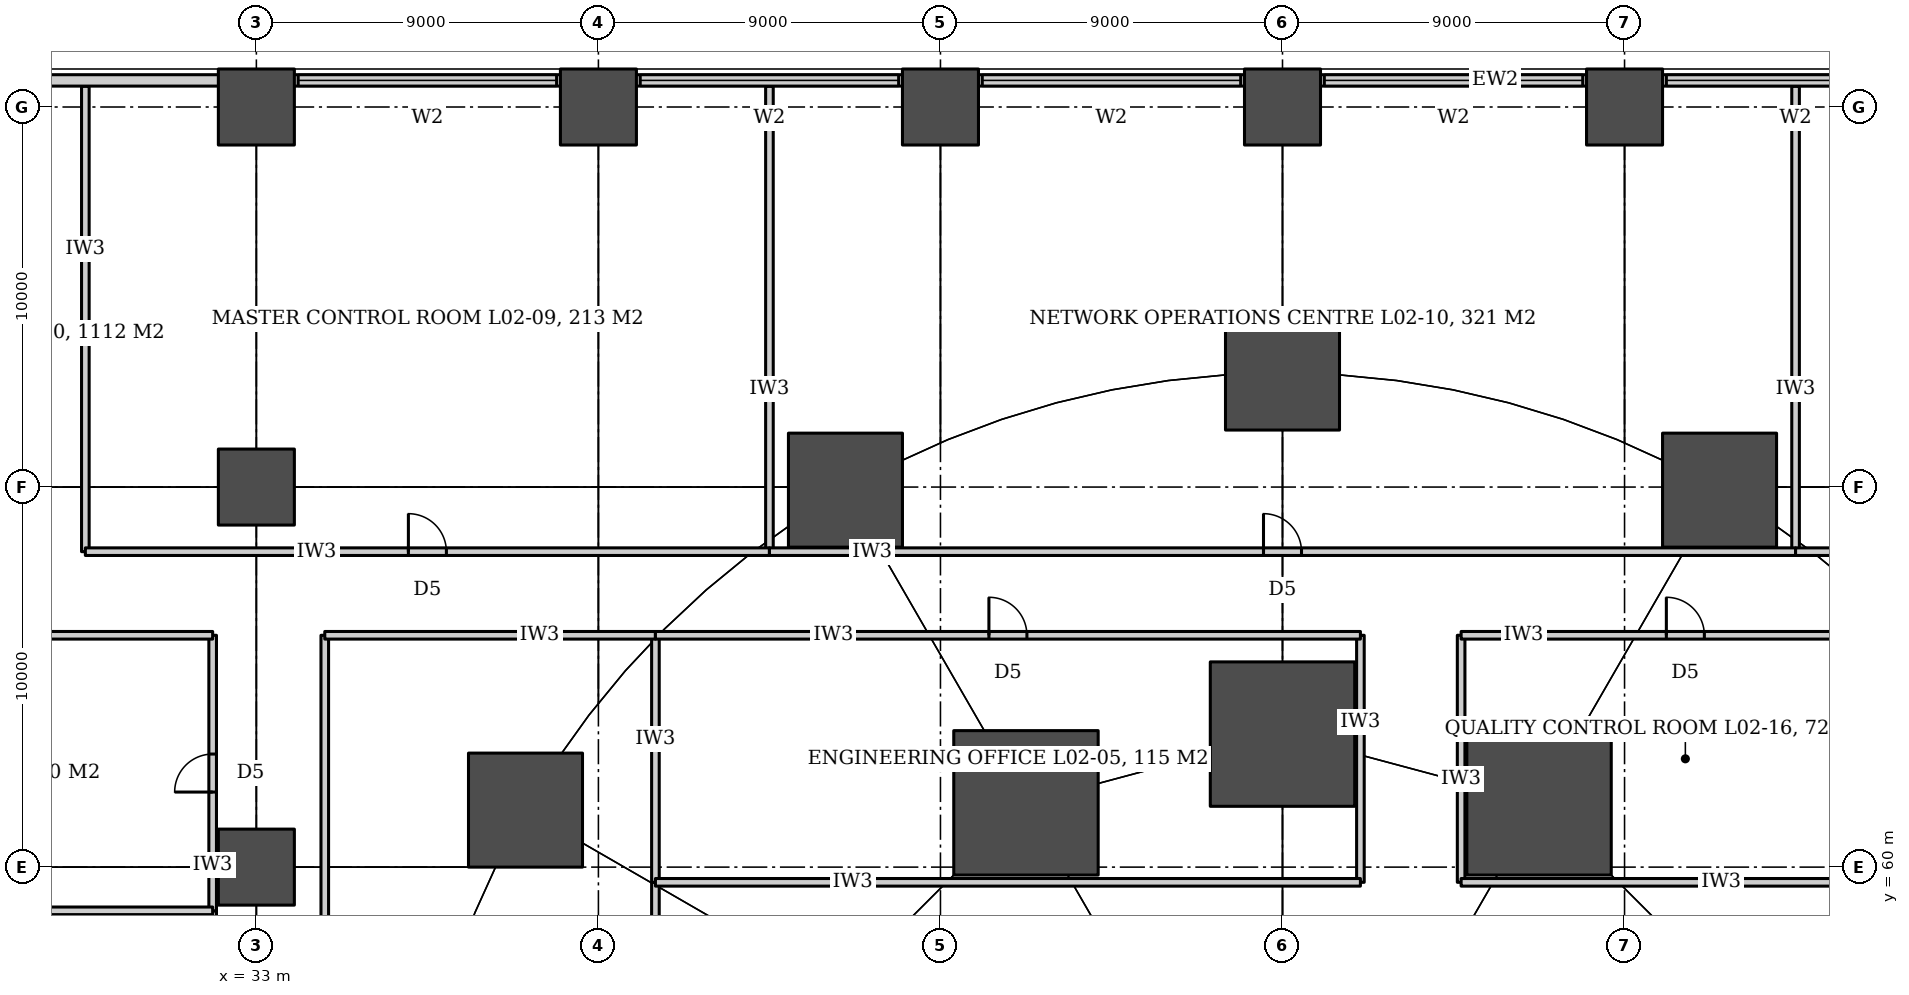
"""IFC4 building model, lengths in metres.
Left out: names, types, materials, properties, quantities, classifications, styles, units other than length and angle.
Written with IfcOpenShell. Run it as: python <this file> out.ifc"""

import sys

from ifc_helpers import new_model, si_unit, direction, frame, frame_2d, origin, origin_2d, place, context, subcontext, project, spatial, rectangle, circle, extrude, element, fill, save


model = new_model("IFC4")
c1 = context("Model", 3, precision=1e-05, world=origin(), true_north=direction((0.0, 1.0)))
c2 = subcontext(c1, "Body", "Model", "MODEL_VIEW")
j1 = project(units=[si_unit("LENGTHUNIT", "METRE"), si_unit("PLANEANGLEUNIT", "RADIAN")], contexts=[c1])
p1 = place(None, origin())
s1 = spatial("IfcSite", under=j1, at=p1, CompositionType="ELEMENT")
p2 = place(p1, origin())
s2 = spatial("IfcBuilding", under=s1, at=p2, CompositionType="ELEMENT")
p3 = place(p2, frame((0.0, 0.0, 15.0)))
s3 = spatial("IfcBuildingStorey", under=s2, at=p3, CompositionType="ELEMENT", Elevation=15.0)
for number, where, z_axis, x_axis in (
    (1, (33.0, 60.0, 0.0), (0.0, 0.0, 1.0), (1.0, 0.0, 0.0)),
    (2, (33.0, 70.0, 0.0), (0.0, 0.0, 1.0), (1.0, 0.0, 0.0)),
    (3, (33.0, 80.0, 0.0), (0.0, 0.0, 1.0), (1.0, 0.0, 0.0)),
    (4, (42.0, 80.0, 0.0), (0.0, 0.0, 1.0), (1.0, 0.0, 0.0)),
    (5, (51.0, 80.0, 0.0), (0.0, 0.0, 1.0), (1.0, 0.0, 0.0)),
    (6, (60.0, 80.0, 0.0), (0.0, 0.0, 1.0), (1.0, 0.0, 0.0)),
    (7, (69.0, 80.0, 0.0), (0.0, 0.0, 1.0), (1.0, 0.0, 0.0)),
):
    element("IfcColumn", number, at=place(p3, frame(where, z_axis=z_axis, x_axis=x_axis)), inside=s3, PredefinedType="COLUMN", context=c2, shape_type="SweptSolid", body=[
        extrude(rectangle(XDim=2.0, YDim=2.0, at=origin_2d()), origin(), (0.0, 0.0, 1.0), 5.0),
    ])
for number, where, z_axis, x_axis in (
    (8, (71.5, 69.919, 0.0), (0.0, 0.0, 1.0), (1.0, 0.0, 0.0)),
    (9, (60.0, 73.0, 0.0), (0.0, 0.0, 1.0), (1.0, 0.0, 0.0)),
    (10, (48.5, 69.919, 0.0), (0.0, 0.0, 1.0), (1.0, 0.0, 0.0)),
    (11, (40.081, 61.5, 0.0), (0.0, 0.0, 1.0), (1.0, 0.0, 0.0)),
):
    element("IfcColumn", number, at=place(p3, frame(where, z_axis=z_axis, x_axis=x_axis)), inside=s3, PredefinedType="COLUMN", context=c2, shape_type="SweptSolid", body=[
        extrude(circle(Radius=1.5, at=origin_2d()), origin(), (0.0, 0.0, 1.0), 5.0),
    ])
for number, where, z_axis, x_axis in (
    (12, (66.75, 61.691, 0.0), (0.0, 0.0, 1.0), (1.0, 0.0, 0.0)),
    (13, (60.0, 63.5, 0.0), (0.0, 0.0, 1.0), (1.0, 0.0, 0.0)),
    (14, (53.25, 61.691, 0.0), (0.0, 0.0, 1.0), (1.0, 0.0, 0.0)),
):
    element("IfcColumn", number, at=place(p3, frame(where, z_axis=z_axis, x_axis=x_axis)), inside=s3, PredefinedType="COLUMN", context=c2, shape_type="SweptSolid", body=[
        extrude(circle(Radius=1.9, at=origin_2d()), origin(), (0.0, 0.0, 1.0), 5.0),
    ])
p4 = place(p3, frame((28.5, 68.3, 0.0), z_axis=(0.0, 0.0, 1.0), x_axis=(0.0, 1.0, 0.0)))
e15 = element("IfcWall", 15, at=p4, inside=s3, PredefinedType="PARTITIONING", context=c2, shape_type="SweptSolid", body=[
    extrude(rectangle(XDim=12.245, YDim=0.2, at=frame_2d((6.123, 0.0))), origin(), (0.0, 0.0, 1.0), 2.68),
])
p5 = place(p3, frame((31.85, 41.15, 0.0), z_axis=(0.0, 0.0, 1.0), x_axis=(0.0, 1.0, 0.0)))
e16 = element("IfcWall", 16, at=p5, inside=s3, PredefinedType="PARTITIONING", context=c2, shape_type="SweptSolid", body=[
    extrude(rectangle(XDim=17.7, YDim=0.2, at=frame_2d((8.85, 0.0))), origin(), (0.0, 0.0, 1.0), 2.18),
])
p6 = place(p5, frame((8.35, 0.0, 0.0)))
e17 = element("IfcOpeningElement", 17, at=p6, cuts=e16, PredefinedType="OPENING", context=c2, shape_type="SweptSolid", body=[
    extrude(rectangle(XDim=1.0, YDim=2.1, at=frame_2d((0.5, 1.05))), frame((0.0, 0.11, 0.0), z_axis=(0.0, -1.0, 0.0), x_axis=(1.0, 0.0, 0.0)), (0.0, 0.0, 1.0), 0.22),
])
p7 = place(p3, frame((31.85, 58.85, 0.0), z_axis=(0.0, 0.0, 1.0), x_axis=(0.0, 1.0, 0.0)))
e18 = element("IfcWall", 18, at=p7, inside=s3, PredefinedType="PARTITIONING", context=c2, shape_type="SweptSolid", body=[
    extrude(rectangle(XDim=7.25, YDim=0.2, at=frame_2d((3.625, 0.0))), origin(), (0.0, 0.0, 1.0), 2.18),
])
p8 = place(p7, frame((3.125, 0.0, 0.0)))
e19 = element("IfcOpeningElement", 19, at=p8, cuts=e18, PredefinedType="OPENING", context=c2, shape_type="SweptSolid", body=[
    extrude(rectangle(XDim=1.0, YDim=2.1, at=frame_2d((0.5, 1.05))), frame((0.0, 0.11, 0.0), z_axis=(0.0, -1.0, 0.0), x_axis=(1.0, 0.0, 0.0)), (0.0, 0.0, 1.0), 0.22),
])
p9 = place(p3, frame((34.8, 48.35, 0.0), z_axis=(0.0, 0.0, 1.0), x_axis=(0.0, 1.0, 0.0)))
e20 = element("IfcWall", 20, at=p9, inside=s3, PredefinedType="PARTITIONING", context=c2, shape_type="SweptSolid", body=[
    extrude(rectangle(XDim=17.75, YDim=0.2, at=frame_2d((8.875, 0.0))), origin(), (0.0, 0.0, 1.0), 2.18),
])
p10 = place(p9, frame((8.375, 0.0, 0.0)))
e21 = element("IfcOpeningElement", 21, at=p10, cuts=e20, PredefinedType="OPENING", context=c2, shape_type="SweptSolid", body=[
    extrude(rectangle(XDim=1.0, YDim=2.1, at=frame_2d((0.5, 1.05))), frame((0.0, 0.11, 0.0), z_axis=(0.0, -1.0, 0.0), x_axis=(1.0, 0.0, 0.0)), (0.0, 0.0, 1.0), 0.22),
])
p11 = place(p3, frame((43.5, 48.35, 0.0), z_axis=(0.0, 0.0, 1.0), x_axis=(0.0, 1.0, 0.0)))
e22 = element("IfcWall", 22, at=p11, inside=s3, PredefinedType="PARTITIONING", context=c2, shape_type="SweptSolid", body=[
    extrude(rectangle(XDim=11.25, YDim=0.2, at=frame_2d((5.625, 0.0))), origin(), (0.0, 0.0, 1.0), 2.08),
])
p12 = place(p3, frame((43.5, 59.6, 0.0), z_axis=(0.0, 0.0, 1.0), x_axis=(0.0, 1.0, 0.0)))
e23 = element("IfcWall", 23, at=p12, inside=s3, PredefinedType="PARTITIONING", context=c2, shape_type="SweptSolid", body=[
    extrude(rectangle(XDim=6.5, YDim=0.2, at=frame_2d((3.25, 0.0))), origin(), (0.0, 0.0, 1.0), 2.08),
])
p13 = place(p3, frame((46.5, 68.3, 0.0), z_axis=(0.0, 0.0, 1.0), x_axis=(0.0, 1.0, 0.0)))
e24 = element("IfcWall", 24, at=p13, inside=s3, PredefinedType="PARTITIONING", context=c2, shape_type="SweptSolid", body=[
    extrude(rectangle(XDim=12.245, YDim=0.2, at=frame_2d((6.123, 0.0))), origin(), (0.0, 0.0, 1.0), 2.68),
])
p14 = place(p3, frame((62.05, 59.6, 0.0), z_axis=(0.0, 0.0, 1.0), x_axis=(0.0, 1.0, 0.0)))
e25 = element("IfcWall", 25, at=p14, inside=s3, PredefinedType="PARTITIONING", context=c2, shape_type="SweptSolid", body=[
    extrude(rectangle(XDim=6.5, YDim=0.2, at=frame_2d((3.25, 0.0))), origin(), (0.0, 0.0, 1.0), 2.08),
])
p15 = place(p3, frame((64.7, 59.6, 0.0), z_axis=(0.0, 0.0, 1.0), x_axis=(0.0, 1.0, 0.0)))
e26 = element("IfcWall", 26, at=p15, inside=s3, PredefinedType="PARTITIONING", context=c2, shape_type="SweptSolid", body=[
    extrude(rectangle(XDim=6.5, YDim=0.2, at=frame_2d((3.25, 0.0))), origin(), (0.0, 0.0, 1.0), 1.48),
])
p16 = place(p3, frame((73.5, 68.3, 0.0), z_axis=(0.0, 0.0, 1.0), x_axis=(0.0, 1.0, 0.0)))
e27 = element("IfcWall", 27, at=p16, inside=s3, PredefinedType="PARTITIONING", context=c2, shape_type="SweptSolid", body=[
    extrude(rectangle(XDim=12.245, YDim=0.2, at=frame_2d((6.123, 0.0))), origin(), (0.0, 0.0, 1.0), 2.68),
])
p17 = place(p3, frame((14.455, 58.85, 0.0), z_axis=(0.0, 0.0, 1.0), x_axis=(1.0, 0.0, 0.0)))
e28 = element("IfcWall", 28, at=p17, inside=s3, PredefinedType="PARTITIONING", context=c2, shape_type="SweptSolid", body=[
    extrude(rectangle(XDim=17.395, YDim=0.2, at=frame_2d((8.698, 0.0))), origin(), (0.0, 0.0, 1.0), 2.68),
])
p18 = place(p3, frame((43.5, 59.6, 0.0), z_axis=(0.0, 0.0, 1.0), x_axis=(1.0, 0.0, 0.0)))
e29 = element("IfcWall", 29, at=p18, inside=s3, PredefinedType="PARTITIONING", context=c2, shape_type="SweptSolid", body=[
    extrude(rectangle(XDim=18.55, YDim=0.2, at=frame_2d((9.275, 0.0))), origin(), (0.0, 0.0, 1.0), 1.48),
])
p19 = place(p3, frame((64.7, 59.6, 0.0), z_axis=(0.0, 0.0, 1.0), x_axis=(1.0, 0.0, 0.0)))
e30 = element("IfcWall", 30, at=p19, inside=s3, PredefinedType="PARTITIONING", context=c2, shape_type="SweptSolid", body=[
    extrude(rectangle(XDim=11.8, YDim=0.2, at=frame_2d((5.9, 0.0))), origin(), (0.0, 0.0, 1.0), 1.48),
])
p20 = place(p3, frame((14.455, 66.1, 0.0), z_axis=(0.0, 0.0, 1.0), x_axis=(1.0, 0.0, 0.0)))
e31 = element("IfcWall", 31, at=p20, inside=s3, PredefinedType="PARTITIONING", context=c2, shape_type="SweptSolid", body=[
    extrude(rectangle(XDim=17.395, YDim=0.2, at=frame_2d((8.698, 0.0))), origin(), (0.0, 0.0, 1.0), 2.68),
])
p21 = place(p3, frame((34.8, 66.1, 0.0), z_axis=(0.0, 0.0, 1.0), x_axis=(1.0, 0.0, 0.0)))
e32 = element("IfcWall", 32, at=p21, inside=s3, PredefinedType="PARTITIONING", context=c2, shape_type="SweptSolid", body=[
    extrude(rectangle(XDim=8.7, YDim=0.2, at=frame_2d((4.35, 0.0))), origin(), (0.0, 0.0, 1.0), 2.68),
])
p22 = place(p3, frame((43.5, 66.1, 0.0), z_axis=(0.0, 0.0, 1.0), x_axis=(1.0, 0.0, 0.0)))
e33 = element("IfcWall", 33, at=p22, inside=s3, PredefinedType="PARTITIONING", context=c2, shape_type="SweptSolid", body=[
    extrude(rectangle(XDim=18.55, YDim=0.2, at=frame_2d((9.275, 0.0))), origin(), (0.0, 0.0, 1.0), 2.08),
])
p23 = place(p22, frame((8.775, 0.0, 0.0)))
e34 = element("IfcOpeningElement", 34, at=p23, cuts=e33, PredefinedType="OPENING", context=c2, shape_type="SweptSolid", body=[
    extrude(rectangle(XDim=1.0, YDim=2.1, at=frame_2d((0.5, 1.05))), frame((0.0, 0.11, 0.0), z_axis=(0.0, -1.0, 0.0), x_axis=(1.0, 0.0, 0.0)), (0.0, 0.0, 1.0), 0.22),
])
p24 = place(p3, frame((64.7, 66.1, 0.0), z_axis=(0.0, 0.0, 1.0), x_axis=(1.0, 0.0, 0.0)))
e35 = element("IfcWall", 35, at=p24, inside=s3, PredefinedType="PARTITIONING", context=c2, shape_type="SweptSolid", body=[
    extrude(rectangle(XDim=11.8, YDim=0.2, at=frame_2d((5.9, 0.0))), origin(), (0.0, 0.0, 1.0), 2.08),
])
p25 = place(p24, frame((5.4, 0.0, 0.0)))
e36 = element("IfcOpeningElement", 36, at=p25, cuts=e35, PredefinedType="OPENING", context=c2, shape_type="SweptSolid", body=[
    extrude(rectangle(XDim=1.0, YDim=2.1, at=frame_2d((0.5, 1.05))), frame((0.0, 0.11, 0.0), z_axis=(0.0, -1.0, 0.0), x_axis=(1.0, 0.0, 0.0)), (0.0, 0.0, 1.0), 0.22),
])
p26 = place(p3, frame((28.5, 68.3, 0.0), z_axis=(0.0, 0.0, 1.0), x_axis=(1.0, 0.0, 0.0)))
e37 = element("IfcWall", 37, at=p26, inside=s3, PredefinedType="PARTITIONING", context=c2, shape_type="SweptSolid", body=[
    extrude(rectangle(XDim=18.0, YDim=0.2, at=frame_2d((9.0, 0.0))), origin(), (0.0, 0.0, 1.0), 2.68),
])
p27 = place(p26, frame((8.5, 0.0, 0.0)))
e38 = element("IfcOpeningElement", 38, at=p27, cuts=e37, PredefinedType="OPENING", context=c2, shape_type="SweptSolid", body=[
    extrude(rectangle(XDim=1.0, YDim=2.1, at=frame_2d((0.5, 1.05))), frame((0.0, 0.11, 0.0), z_axis=(0.0, -1.0, 0.0), x_axis=(1.0, 0.0, 0.0)), (0.0, 0.0, 1.0), 0.22),
])
p28 = place(p3, frame((46.5, 68.3, 0.0), z_axis=(0.0, 0.0, 1.0), x_axis=(1.0, 0.0, 0.0)))
e39 = element("IfcWall", 39, at=p28, inside=s3, PredefinedType="PARTITIONING", context=c2, shape_type="SweptSolid", body=[
    extrude(rectangle(XDim=27.0, YDim=0.2, at=frame_2d((13.5, 0.0))), origin(), (0.0, 0.0, 1.0), 2.08),
])
p29 = place(p28, frame((13.0, 0.0, 0.0)))
e40 = element("IfcOpeningElement", 40, at=p29, cuts=e39, PredefinedType="OPENING", context=c2, shape_type="SweptSolid", body=[
    extrude(rectangle(XDim=1.0, YDim=2.1, at=frame_2d((0.5, 1.05))), frame((0.0, 0.11, 0.0), z_axis=(0.0, -1.0, 0.0), x_axis=(1.0, 0.0, 0.0)), (0.0, 0.0, 1.0), 0.22),
])
p30 = place(p3, frame((73.5, 68.3, 0.0), z_axis=(0.0, 0.0, 1.0), x_axis=(1.0, 0.0, 0.0)))
e41 = element("IfcWall", 41, at=p30, inside=s3, PredefinedType="PARTITIONING", context=c2, shape_type="SweptSolid", body=[
    extrude(rectangle(XDim=18.0, YDim=0.2, at=frame_2d((9.0, 0.0))), origin(), (0.0, 0.0, 1.0), 2.68),
])
p31 = place(p30, frame((8.5, 0.0, 0.0)))
e42 = element("IfcOpeningElement", 42, at=p31, cuts=e41, PredefinedType="OPENING", context=c2, shape_type="SweptSolid", body=[
    extrude(rectangle(XDim=1.0, YDim=2.1, at=frame_2d((0.5, 1.05))), frame((0.0, 0.11, 0.0), z_axis=(0.0, -1.0, 0.0), x_axis=(1.0, 0.0, 0.0)), (0.0, 0.0, 1.0), 0.22),
])
p32 = place(p3, frame((95.0, 80.7, 0.0), z_axis=(0.0, 0.0, 1.0), x_axis=(-1.0, 0.0, 0.0)))
e43 = element("IfcWall", 43, at=p32, inside=s3, PredefinedType="SOLIDWALL", context=c2, shape_type="SweptSolid", body=[
    extrude(rectangle(XDim=70.0, YDim=0.3, at=frame_2d((35.0, 0.0))), origin(), (0.0, 0.0, 1.0), 4.7),
])
p33 = place(p32, frame((54.1, 0.0, 1.2)))
e44 = element("IfcOpeningElement", 44, at=p33, cuts=e43, PredefinedType="OPENING", context=c2, shape_type="SweptSolid", body=[
    extrude(rectangle(XDim=6.8, YDim=1.5, at=frame_2d((3.4, 0.75))), frame((0.0, 0.16, 0.0), z_axis=(0.0, -1.0, 0.0), x_axis=(1.0, 0.0, 0.0)), (0.0, 0.0, 1.0), 0.32),
])
p34 = place(p32, frame((45.1, 0.0, 1.2)))
e45 = element("IfcOpeningElement", 45, at=p34, cuts=e43, PredefinedType="OPENING", context=c2, shape_type="SweptSolid", body=[
    extrude(rectangle(XDim=6.8, YDim=1.5, at=frame_2d((3.4, 0.75))), frame((0.0, 0.16, 0.0), z_axis=(0.0, -1.0, 0.0), x_axis=(1.0, 0.0, 0.0)), (0.0, 0.0, 1.0), 0.32),
])
p35 = place(p32, frame((36.1, 0.0, 1.2)))
e46 = element("IfcOpeningElement", 46, at=p35, cuts=e43, PredefinedType="OPENING", context=c2, shape_type="SweptSolid", body=[
    extrude(rectangle(XDim=6.8, YDim=1.5, at=frame_2d((3.4, 0.75))), frame((0.0, 0.16, 0.0), z_axis=(0.0, -1.0, 0.0), x_axis=(1.0, 0.0, 0.0)), (0.0, 0.0, 1.0), 0.32),
])
p36 = place(p32, frame((27.1, 0.0, 1.2)))
e47 = element("IfcOpeningElement", 47, at=p36, cuts=e43, PredefinedType="OPENING", context=c2, shape_type="SweptSolid", body=[
    extrude(rectangle(XDim=6.8, YDim=1.5, at=frame_2d((3.4, 0.75))), frame((0.0, 0.16, 0.0), z_axis=(0.0, -1.0, 0.0), x_axis=(1.0, 0.0, 0.0)), (0.0, 0.0, 1.0), 0.32),
])
p37 = place(p32, frame((18.1, 0.0, 1.2)))
e48 = element("IfcOpeningElement", 48, at=p37, cuts=e43, PredefinedType="OPENING", context=c2, shape_type="SweptSolid", body=[
    extrude(rectangle(XDim=6.8, YDim=1.5, at=frame_2d((3.4, 0.75))), frame((0.0, 0.16, 0.0), z_axis=(0.0, -1.0, 0.0), x_axis=(1.0, 0.0, 0.0)), (0.0, 0.0, 1.0), 0.32),
])
p38 = place(p32, frame((9.1, 0.0, 1.2)))
e49 = element("IfcOpeningElement", 49, at=p38, cuts=e43, PredefinedType="OPENING", context=c2, shape_type="SweptSolid", body=[
    extrude(rectangle(XDim=6.8, YDim=1.5, at=frame_2d((3.4, 0.75))), frame((0.0, 0.16, 0.0), z_axis=(0.0, -1.0, 0.0), x_axis=(1.0, 0.0, 0.0)), (0.0, 0.0, 1.0), 0.32),
])
p39 = place(p27, origin())
e50 = element("IfcDoor", 50, at=p39, inside=s3, OperationType="SINGLE_SWING_LEFT", PredefinedType="DOOR", context=c2, shape_type="SweptSolid", body=[
    extrude(rectangle(XDim=1.0, YDim=2.1, at=frame_2d((0.5, 1.05))), frame((0.0, 0.025, 0.0), z_axis=(0.0, -1.0, 0.0), x_axis=(1.0, 0.0, 0.0)), (0.0, 0.0, 1.0), 0.05),
])
fill(e38, e50)
p40 = place(p29, origin())
e51 = element("IfcDoor", 51, at=p40, inside=s3, OperationType="SINGLE_SWING_LEFT", PredefinedType="DOOR", context=c2, shape_type="SweptSolid", body=[
    extrude(rectangle(XDim=1.0, YDim=2.1, at=frame_2d((0.5, 1.05))), frame((0.0, 0.025, 0.0), z_axis=(0.0, -1.0, 0.0), x_axis=(1.0, 0.0, 0.0)), (0.0, 0.0, 1.0), 0.05),
])
fill(e40, e51)
p41 = place(p23, origin())
e52 = element("IfcDoor", 52, at=p41, inside=s3, OperationType="SINGLE_SWING_LEFT", PredefinedType="DOOR", context=c2, shape_type="SweptSolid", body=[
    extrude(rectangle(XDim=1.0, YDim=2.1, at=frame_2d((0.5, 1.05))), frame((0.0, 0.025, 0.0), z_axis=(0.0, -1.0, 0.0), x_axis=(1.0, 0.0, 0.0)), (0.0, 0.0, 1.0), 0.05),
])
fill(e34, e52)
p42 = place(p25, origin())
e53 = element("IfcDoor", 53, at=p42, inside=s3, OperationType="SINGLE_SWING_LEFT", PredefinedType="DOOR", context=c2, shape_type="SweptSolid", body=[
    extrude(rectangle(XDim=1.0, YDim=2.1, at=frame_2d((0.5, 1.05))), frame((0.0, 0.025, 0.0), z_axis=(0.0, -1.0, 0.0), x_axis=(1.0, 0.0, 0.0)), (0.0, 0.0, 1.0), 0.05),
])
fill(e36, e53)
p43 = place(p8, origin())
e54 = element("IfcDoor", 54, at=p43, inside=s3, OperationType="SINGLE_SWING_LEFT", PredefinedType="DOOR", context=c2, shape_type="SweptSolid", body=[
    extrude(rectangle(XDim=1.0, YDim=2.1, at=frame_2d((0.5, 1.05))), frame((0.0, 0.025, 0.0), z_axis=(0.0, -1.0, 0.0), x_axis=(1.0, 0.0, 0.0)), (0.0, 0.0, 1.0), 0.05),
])
fill(e19, e54)
p44 = place(p33, origin())
e55 = element("IfcWindow", 55, at=p44, inside=s3, PartitioningType="SINGLE_PANEL", PredefinedType="WINDOW", context=c2, shape_type="SweptSolid", body=[
    extrude(rectangle(XDim=6.8, YDim=1.5, at=frame_2d((3.4, 0.75))), frame((0.0, 0.03, 0.0), z_axis=(0.0, -1.0, 0.0), x_axis=(1.0, 0.0, 0.0)), (0.0, 0.0, 1.0), 0.06),
])
fill(e44, e55)
p45 = place(p34, origin())
e56 = element("IfcWindow", 56, at=p45, inside=s3, PartitioningType="SINGLE_PANEL", PredefinedType="WINDOW", context=c2, shape_type="SweptSolid", body=[
    extrude(rectangle(XDim=6.8, YDim=1.5, at=frame_2d((3.4, 0.75))), frame((0.0, 0.03, 0.0), z_axis=(0.0, -1.0, 0.0), x_axis=(1.0, 0.0, 0.0)), (0.0, 0.0, 1.0), 0.06),
])
fill(e45, e56)
p46 = place(p35, origin())
e57 = element("IfcWindow", 57, at=p46, inside=s3, PartitioningType="SINGLE_PANEL", PredefinedType="WINDOW", context=c2, shape_type="SweptSolid", body=[
    extrude(rectangle(XDim=6.8, YDim=1.5, at=frame_2d((3.4, 0.75))), frame((0.0, 0.03, 0.0), z_axis=(0.0, -1.0, 0.0), x_axis=(1.0, 0.0, 0.0)), (0.0, 0.0, 1.0), 0.06),
])
fill(e46, e57)
p47 = place(p36, origin())
e58 = element("IfcWindow", 58, at=p47, inside=s3, PartitioningType="SINGLE_PANEL", PredefinedType="WINDOW", context=c2, shape_type="SweptSolid", body=[
    extrude(rectangle(XDim=6.8, YDim=1.5, at=frame_2d((3.4, 0.75))), frame((0.0, 0.03, 0.0), z_axis=(0.0, -1.0, 0.0), x_axis=(1.0, 0.0, 0.0)), (0.0, 0.0, 1.0), 0.06),
])
fill(e47, e58)
p48 = place(p37, origin())
e59 = element("IfcWindow", 59, at=p48, inside=s3, PartitioningType="SINGLE_PANEL", PredefinedType="WINDOW", context=c2, shape_type="SweptSolid", body=[
    extrude(rectangle(XDim=6.8, YDim=1.5, at=frame_2d((3.4, 0.75))), frame((0.0, 0.03, 0.0), z_axis=(0.0, -1.0, 0.0), x_axis=(1.0, 0.0, 0.0)), (0.0, 0.0, 1.0), 0.06),
])
fill(e48, e59)
save(model, sys.argv[1])
